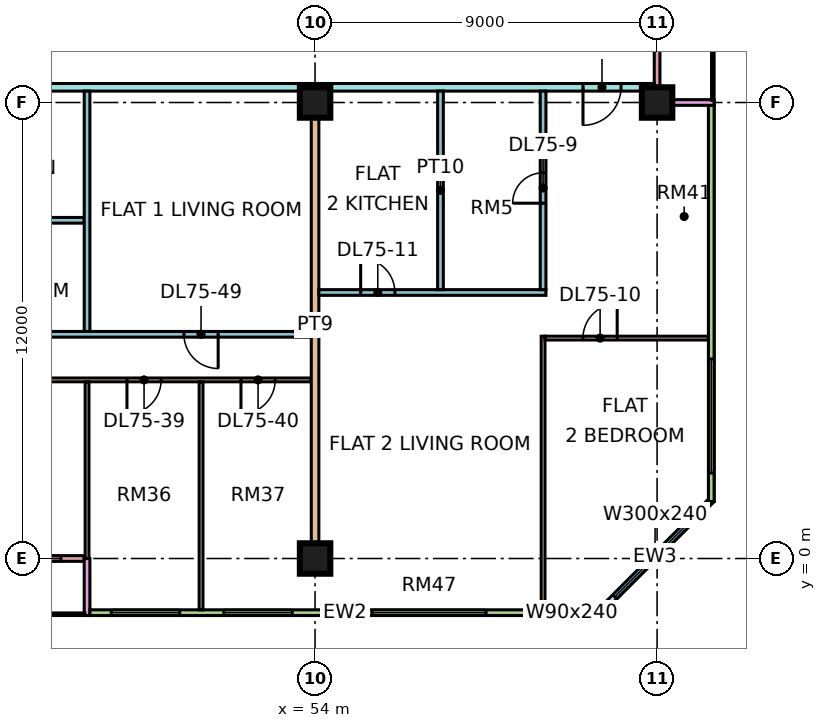
"""IFC4 building model, lengths in metres.
Left out: names, types, materials, properties, quantities, classifications, styles, units other than length and angle.
Written with IfcOpenShell. Run it as: python <this file> out.ifc"""

import sys

from ifc_helpers import new_model, si_unit, direction, frame, frame_2d, origin, origin_2d, place, context, subcontext, project, spatial, rectangle, extrude, element, fill, save


model = new_model("IFC4")
c1 = context("Model", 3, precision=1e-05, world=origin(), true_north=direction((0.0, 1.0)))
c2 = subcontext(c1, "Body", "Model", "MODEL_VIEW")
j1 = project(units=[si_unit("LENGTHUNIT", "METRE"), si_unit("PLANEANGLEUNIT", "RADIAN")], contexts=[c1])
p1 = place(None, origin())
s1 = spatial("IfcSite", under=j1, at=p1, CompositionType="ELEMENT")
p2 = place(p1, origin())
s2 = spatial("IfcBuilding", under=s1, at=p2, CompositionType="ELEMENT")
p3 = place(p2, frame((0.0, 0.0, 318.4)))
s3 = spatial("IfcBuildingStorey", under=s2, at=p3, CompositionType="ELEMENT", Elevation=318.4)
for number, where, z_axis, x_axis in (
    (1, (54.0, 0.0, 0.0), (0.0, 0.0, 1.0), (1.0, 0.0, 0.0)),
    (2, (54.0, 12.0, 0.0), (0.0, 0.0, 1.0), (1.0, 0.0, 0.0)),
    (3, (63.0, 12.0, 0.0), (0.0, 0.0, 1.0), (1.0, 0.0, 0.0)),
):
    element("IfcColumn", number, at=place(p3, frame(where, z_axis=z_axis, x_axis=x_axis)), inside=s3, PredefinedType="COLUMN", context=c2, shape_type="SweptSolid", body=[
        extrude(rectangle(XDim=0.8, YDim=0.8, at=origin_2d()), origin(), (0.0, 0.0, 1.0), 3.75),
    ])
p4 = place(p3, frame((36.075, 0.0, 0.0), z_axis=(0.0, 0.0, 1.0), x_axis=(1.0, 0.0, 0.0)))
e4 = element("IfcWall", 4, at=p4, inside=s3, PredefinedType="SOLIDWALL", context=c2, shape_type="SweptSolid", body=[
    extrude(rectangle(XDim=11.85, YDim=0.15, at=frame_2d((5.925, 0.0))), origin(), (0.0, 0.0, 1.0), 3.3),
])
p5 = place(p4, frame((0.775, 0.0, 0.45)))
e5 = element("IfcOpeningElement", 5, at=p5, cuts=e4, PredefinedType="OPENING", context=c2, shape_type="SweptSolid", body=[
    extrude(rectangle(XDim=1.8, YDim=2.4, at=frame_2d((0.9, 1.2))), frame((0.0, 0.085, 0.0), z_axis=(0.0, -1.0, 0.0), x_axis=(1.0, 0.0, 0.0)), (0.0, 0.0, 1.0), 0.17),
])
p6 = place(p4, frame((4.775, 0.0, 0.0)))
e6 = element("IfcOpeningElement", 6, at=p6, cuts=e4, PredefinedType="OPENING", context=c2, shape_type="SweptSolid", body=[
    extrude(rectangle(XDim=1.8, YDim=2.4, at=frame_2d((0.9, 1.2))), frame((0.0, 0.085, 0.0), z_axis=(0.0, -1.0, 0.0), x_axis=(1.0, 0.0, 0.0)), (0.0, 0.0, 1.0), 0.17),
])
p7 = place(p4, frame((10.038, 0.0, 0.45)))
e7 = element("IfcOpeningElement", 7, at=p7, cuts=e4, PredefinedType="OPENING", context=c2, shape_type="SweptSolid", body=[
    extrude(rectangle(XDim=1.2, YDim=2.4, at=frame_2d((0.6, 1.2))), frame((0.0, 0.085, 0.0), z_axis=(0.0, -1.0, 0.0), x_axis=(1.0, 0.0, 0.0)), (0.0, 0.0, 1.0), 0.17),
])
p8 = place(p3, frame((48.0, -1.5, 0.0), z_axis=(0.0, 0.0, 1.0), x_axis=(0.0, 1.0, 0.0)))
e8 = element("IfcWall", 8, at=p8, inside=s3, PredefinedType="SOLIDWALL", context=c2, shape_type="SweptSolid", body=[
    extrude(rectangle(XDim=1.5, YDim=0.15, at=frame_2d((0.75, 0.0))), origin(), (0.0, 0.0, 1.0), 3.3),
])
p9 = place(p3, frame((48.075, -1.425, 0.0), z_axis=(0.0, 0.0, 1.0), x_axis=(1.0, 0.0, 0.0)))
e9 = element("IfcWall", 9, at=p9, inside=s3, PredefinedType="SOLIDWALL", context=c2, shape_type="SweptSolid", body=[
    extrude(rectangle(XDim=13.425, YDim=0.15, at=frame_2d((6.712, 0.0))), origin(), (0.0, 0.0, 1.0), 3.3),
])
p10 = place(p9, frame((0.562, 0.0, 0.45)))
e10 = element("IfcOpeningElement", 10, at=p10, cuts=e9, PredefinedType="OPENING", context=c2, shape_type="SweptSolid", body=[
    extrude(rectangle(XDim=1.8, YDim=2.4, at=frame_2d((0.9, 1.2))), frame((0.0, 0.085, 0.0), z_axis=(0.0, -1.0, 0.0), x_axis=(1.0, 0.0, 0.0)), (0.0, 0.0, 1.0), 0.17),
])
p11 = place(p9, frame((3.525, 0.0, 0.45)))
e11 = element("IfcOpeningElement", 11, at=p11, cuts=e9, PredefinedType="OPENING", context=c2, shape_type="SweptSolid", body=[
    extrude(rectangle(XDim=1.8, YDim=2.4, at=frame_2d((0.9, 1.2))), frame((0.0, 0.085, 0.0), z_axis=(0.0, -1.0, 0.0), x_axis=(1.0, 0.0, 0.0)), (0.0, 0.0, 1.0), 0.17),
])
p12 = place(p9, frame((7.425, 0.0, 0.45)))
e12 = element("IfcOpeningElement", 12, at=p12, cuts=e9, PredefinedType="OPENING", context=c2, shape_type="SweptSolid", body=[
    extrude(rectangle(XDim=3.0, YDim=2.4, at=frame_2d((1.5, 1.2))), frame((0.0, 0.085, 0.0), z_axis=(0.0, -1.0, 0.0), x_axis=(1.0, 0.0, 0.0)), (0.0, 0.0, 1.0), 0.17),
])
p13 = place(p9, frame((12.225, 0.0, 0.45)))
e13 = element("IfcOpeningElement", 13, at=p13, cuts=e9, PredefinedType="OPENING", context=c2, shape_type="SweptSolid", body=[
    extrude(rectangle(XDim=0.9, YDim=2.4, at=frame_2d((0.45, 1.2))), frame((0.0, 0.085, 0.0), z_axis=(0.0, -1.0, 0.0), x_axis=(1.0, 0.0, 0.0)), (0.0, 0.0, 1.0), 0.17),
])
p14 = place(p3, frame((61.447, -1.447, 0.0), z_axis=(0.0, 0.0, 1.0), x_axis=(0.707106781187, 0.707106781187, 0.0)))
e14 = element("IfcWall", 14, at=p14, inside=s3, PredefinedType="SOLIDWALL", context=c2, shape_type="SweptSolid", body=[
    extrude(rectangle(XDim=4.243, YDim=0.15, at=frame_2d((2.121, 0.0))), origin(), (0.0, 0.0, 1.0), 3.3),
])
p15 = place(p14, frame((0.621, 0.0, 0.45)))
e15 = element("IfcOpeningElement", 15, at=p15, cuts=e14, PredefinedType="OPENING", context=c2, shape_type="SweptSolid", body=[
    extrude(rectangle(XDim=3.0, YDim=2.4, at=frame_2d((1.5, 1.2))), frame((0.0, 0.085, 0.0), z_axis=(0.0, -1.0, 0.0), x_axis=(1.0, 0.0, 0.0)), (0.0, 0.0, 1.0), 0.17),
])
p16 = place(p3, frame((64.425, 1.5, 0.0), z_axis=(0.0, 0.0, 1.0), x_axis=(0.0, 1.0, 0.0)))
e16 = element("IfcWall", 16, at=p16, inside=s3, PredefinedType="SOLIDWALL", context=c2, shape_type="SweptSolid", body=[
    extrude(rectangle(XDim=10.425, YDim=0.15, at=frame_2d((5.212, 0.0))), origin(), (0.0, 0.0, 1.0), 3.3),
])
p17 = place(p16, frame((0.75, 0.0, 0.45)))
e17 = element("IfcOpeningElement", 17, at=p17, cuts=e16, PredefinedType="OPENING", context=c2, shape_type="SweptSolid", body=[
    extrude(rectangle(XDim=3.0, YDim=2.4, at=frame_2d((1.5, 1.2))), frame((0.0, 0.085, 0.0), z_axis=(0.0, -1.0, 0.0), x_axis=(1.0, 0.0, 0.0)), (0.0, 0.0, 1.0), 0.17),
])
p18 = place(p3, frame((63.0, 12.075, 0.0), z_axis=(0.0, 0.0, 1.0), x_axis=(0.0, 1.0, 0.0)))
e18 = element("IfcWall", 18, at=p18, inside=s3, PredefinedType="SOLIDWALL", context=c2, shape_type="SweptSolid", body=[
    extrude(rectangle(XDim=10.35, YDim=0.15, at=frame_2d((5.175, 0.0))), origin(), (0.0, 0.0, 1.0), 3.3),
])
p19 = place(p18, frame((6.038, 0.0, 0.0)))
e19 = element("IfcOpeningElement", 19, at=p19, cuts=e18, PredefinedType="OPENING", context=c2, shape_type="SweptSolid", body=[
    extrude(rectangle(XDim=1.8, YDim=2.4, at=frame_2d((0.9, 1.2))), frame((0.0, 0.085, 0.0), z_axis=(0.0, -1.0, 0.0), x_axis=(1.0, 0.0, 0.0)), (0.0, 0.0, 1.0), 0.17),
])
p20 = place(p3, frame((64.5, 12.0, 0.0), z_axis=(0.0, 0.0, 1.0), x_axis=(-1.0, 0.0, 0.0)))
e20 = element("IfcWall", 20, at=p20, inside=s3, PredefinedType="SOLIDWALL", context=c2, shape_type="SweptSolid", body=[
    extrude(rectangle(XDim=1.5, YDim=0.15, at=frame_2d((0.75, 0.0))), origin(), (0.0, 0.0, 1.0), 3.3),
])
p21 = place(p3, frame((33.05, 4.7, 0.0), z_axis=(0.0, 0.0, 1.0), x_axis=(1.0, 0.0, 0.0)))
e21 = element("IfcWall", 21, at=p21, inside=s3, PredefinedType="PARTITIONING", context=c2, shape_type="SweptSolid", body=[
    extrude(rectangle(XDim=20.85, YDim=0.1, at=frame_2d((10.425, 0.0))), origin(), (0.0, 0.0, 1.0), 3.3),
])
p22 = place(p21, frame((1.0, 0.0, 0.0)))
e22 = element("IfcOpeningElement", 22, at=p22, cuts=e21, PredefinedType="OPENING", context=c2, shape_type="SweptSolid", body=[
    extrude(rectangle(XDim=0.9, YDim=2.1, at=frame_2d((0.45, 1.05))), frame((0.0, 0.06, 0.0), z_axis=(0.0, -1.0, 0.0), x_axis=(1.0, 0.0, 0.0)), (0.0, 0.0, 1.0), 0.12),
])
p23 = place(p21, frame((4.0, 0.0, 0.0)))
e23 = element("IfcOpeningElement", 23, at=p23, cuts=e21, PredefinedType="OPENING", context=c2, shape_type="SweptSolid", body=[
    extrude(rectangle(XDim=0.9, YDim=2.1, at=frame_2d((0.45, 1.05))), frame((0.0, 0.06, 0.0), z_axis=(0.0, -1.0, 0.0), x_axis=(1.0, 0.0, 0.0)), (0.0, 0.0, 1.0), 0.12),
])
p24 = place(p21, frame((16.0, 0.0, 0.0)))
e24 = element("IfcOpeningElement", 24, at=p24, cuts=e21, PredefinedType="OPENING", context=c2, shape_type="SweptSolid", body=[
    extrude(rectangle(XDim=0.9, YDim=2.1, at=frame_2d((0.45, 1.05))), frame((0.0, 0.06, 0.0), z_axis=(0.0, -1.0, 0.0), x_axis=(1.0, 0.0, 0.0)), (0.0, 0.0, 1.0), 0.12),
])
p25 = place(p21, frame((19.0, 0.0, 0.0)))
e25 = element("IfcOpeningElement", 25, at=p25, cuts=e21, PredefinedType="OPENING", context=c2, shape_type="SweptSolid", body=[
    extrude(rectangle(XDim=0.9, YDim=2.1, at=frame_2d((0.45, 1.05))), frame((0.0, 0.06, 0.0), z_axis=(0.0, -1.0, 0.0), x_axis=(1.0, 0.0, 0.0)), (0.0, 0.0, 1.0), 0.12),
])
p26 = place(p21, frame((10.0, 0.0, 0.0)))
e26 = element("IfcOpeningElement", 26, at=p26, cuts=e21, PredefinedType="OPENING", context=c2, shape_type="SweptSolid", body=[
    extrude(rectangle(XDim=0.9, YDim=2.1, at=frame_2d((0.45, 1.05))), frame((0.0, 0.06, 0.0), z_axis=(0.0, -1.0, 0.0), x_axis=(1.0, 0.0, 0.0)), (0.0, 0.0, 1.0), 0.12),
])
p27 = place(p3, frame((40.65, 12.4, 0.0), z_axis=(0.0, 0.0, 1.0), x_axis=(1.0, 0.0, 0.0)))
e27 = element("IfcWall", 27, at=p27, inside=s3, PredefinedType="PARTITIONING", context=c2, shape_type="SweptSolid", body=[
    extrude(rectangle(XDim=22.276, YDim=0.2, at=frame_2d((11.138, 0.0))), origin(), (0.0, 0.0, 1.0), 3.3),
])
p28 = place(p27, frame((20.4, 0.0, 0.0)))
e28 = element("IfcOpeningElement", 28, at=p28, cuts=e27, PredefinedType="OPENING", context=c2, shape_type="SweptSolid", body=[
    extrude(rectangle(XDim=1.0, YDim=2.1, at=frame_2d((0.5, 1.05))), frame((0.0, 0.11, 0.0), z_axis=(0.0, -1.0, 0.0), x_axis=(1.0, 0.0, 0.0)), (0.0, 0.0, 1.0), 0.22),
])
p29 = place(p27, frame((1.05, 0.0, 0.0)))
e29 = element("IfcOpeningElement", 29, at=p29, cuts=e27, PredefinedType="OPENING", context=c2, shape_type="SweptSolid", body=[
    extrude(rectangle(XDim=1.0, YDim=2.1, at=frame_2d((0.5, 1.05))), frame((0.0, 0.11, 0.0), z_axis=(0.0, -1.0, 0.0), x_axis=(1.0, 0.0, 0.0)), (0.0, 0.0, 1.0), 0.22),
])
p30 = place(p3, frame((43.575, 5.9, 0.0), z_axis=(0.0, 0.0, 1.0), x_axis=(1.0, 0.0, 0.0)))
e30 = element("IfcWall", 30, at=p30, inside=s3, PredefinedType="PARTITIONING", context=c2, shape_type="SweptSolid", body=[
    extrude(rectangle(XDim=10.325, YDim=0.15, at=frame_2d((5.163, 0.0))), origin(), (0.0, 0.0, 1.0), 3.3),
])
p31 = place(p30, frame((1.825, 0.0, 0.0)))
e31 = element("IfcOpeningElement", 31, at=p31, cuts=e30, PredefinedType="OPENING", context=c2, shape_type="SweptSolid", body=[
    extrude(rectangle(XDim=0.8, YDim=2.1, at=frame_2d((0.4, 1.05))), frame((0.0, 0.085, 0.0), z_axis=(0.0, -1.0, 0.0), x_axis=(1.0, 0.0, 0.0)), (0.0, 0.0, 1.0), 0.17),
])
p32 = place(p30, frame((6.975, 0.0, 0.0)))
e32 = element("IfcOpeningElement", 32, at=p32, cuts=e30, PredefinedType="OPENING", context=c2, shape_type="SweptSolid", body=[
    extrude(rectangle(XDim=0.9, YDim=2.1, at=frame_2d((0.45, 1.05))), frame((0.0, 0.085, 0.0), z_axis=(0.0, -1.0, 0.0), x_axis=(1.0, 0.0, 0.0)), (0.0, 0.0, 1.0), 0.17),
])
p33 = place(p3, frame((43.725, 8.9, 0.0), z_axis=(0.0, 0.0, 1.0), x_axis=(1.0, 0.0, 0.0)))
e33 = element("IfcWall", 33, at=p33, inside=s3, PredefinedType="PARTITIONING", context=c2, shape_type="SweptSolid", body=[
    extrude(rectangle(XDim=4.2, YDim=0.15, at=frame_2d((2.1, 0.0))), origin(), (0.0, 0.0, 1.0), 3.3),
])
p34 = place(p3, frame((48.0, 0.0, 0.0), z_axis=(0.0, 0.0, 1.0), x_axis=(0.0, 1.0, 0.0)))
e34 = element("IfcWall", 34, at=p34, inside=s3, PredefinedType="PARTITIONING", context=c2, shape_type="SweptSolid", body=[
    extrude(rectangle(XDim=4.65, YDim=0.1, at=frame_2d((2.325, 0.0))), origin(), (0.0, 0.0, 1.0), 3.3),
])
p35 = place(p3, frame((48.0, 5.975, 0.0), z_axis=(0.0, 0.0, 1.0), x_axis=(0.0, 1.0, 0.0)))
e35 = element("IfcWall", 35, at=p35, inside=s3, PredefinedType="PARTITIONING", context=c2, shape_type="SweptSolid", body=[
    extrude(rectangle(XDim=6.325, YDim=0.15, at=frame_2d((3.163, 0.0))), origin(), (0.0, 0.0, 1.0), 3.3),
])
p36 = place(p3, frame((51.0, -1.351, 0.0), z_axis=(0.0, 0.0, 1.0), x_axis=(0.0, 1.0, 0.0)))
e36 = element("IfcWall", 36, at=p36, inside=s3, PredefinedType="PARTITIONING", context=c2, shape_type="SweptSolid", body=[
    extrude(rectangle(XDim=6.001, YDim=0.1, at=frame_2d((3.0, 0.0))), origin(), (0.0, 0.0, 1.0), 3.3),
])
p37 = place(p3, frame((54.0, 0.0, 0.0), z_axis=(0.0, 0.0, 1.0), x_axis=(0.0, 1.0, 0.0)))
e37 = element("IfcWall", 37, at=p37, inside=s3, PredefinedType="PARTITIONING", context=c2, shape_type="SweptSolid", body=[
    extrude(rectangle(XDim=12.3, YDim=0.2, at=frame_2d((6.15, 0.0))), origin(), (0.0, 0.0, 1.0), 3.3),
])
p38 = place(p3, frame((54.1, 7.0, 0.0), z_axis=(0.0, 0.0, 1.0), x_axis=(1.0, 0.0, 0.0)))
e38 = element("IfcWall", 38, at=p38, inside=s3, PredefinedType="PARTITIONING", context=c2, shape_type="SweptSolid", body=[
    extrude(rectangle(XDim=5.975, YDim=0.15, at=frame_2d((2.987, 0.0))), origin(), (0.0, 0.0, 1.0), 3.3),
])
p39 = place(p38, frame((1.1, 0.0, 0.0)))
e39 = element("IfcOpeningElement", 39, at=p39, cuts=e38, PredefinedType="OPENING", context=c2, shape_type="SweptSolid", body=[
    extrude(rectangle(XDim=0.9, YDim=2.1, at=frame_2d((0.45, 1.05))), frame((0.0, 0.085, 0.0), z_axis=(0.0, -1.0, 0.0), x_axis=(1.0, 0.0, 0.0)), (0.0, 0.0, 1.0), 0.17),
])
p40 = place(p3, frame((57.3, 7.075, 0.0), z_axis=(0.0, 0.0, 1.0), x_axis=(0.0, 1.0, 0.0)))
e40 = element("IfcWall", 40, at=p40, inside=s3, PredefinedType="PARTITIONING", context=c2, shape_type="SweptSolid", body=[
    extrude(rectangle(XDim=5.225, YDim=0.15, at=frame_2d((2.613, 0.0))), origin(), (0.0, 0.0, 1.0), 3.3),
])
p41 = place(p3, frame((60.0, -1.35, 0.0), z_axis=(0.0, 0.0, 1.0), x_axis=(0.0, 1.0, 0.0)))
e41 = element("IfcWall", 41, at=p41, inside=s3, PredefinedType="PARTITIONING", context=c2, shape_type="SweptSolid", body=[
    extrude(rectangle(XDim=7.2, YDim=0.1, at=frame_2d((3.6, 0.0))), origin(), (0.0, 0.0, 1.0), 3.3),
])
p42 = place(p3, frame((60.0, 7.075, 0.0), z_axis=(0.0, 0.0, 1.0), x_axis=(0.0, 1.0, 0.0)))
e42 = element("IfcWall", 42, at=p42, inside=s3, PredefinedType="PARTITIONING", context=c2, shape_type="SweptSolid", body=[
    extrude(rectangle(XDim=5.225, YDim=0.15, at=frame_2d((2.613, 0.0))), origin(), (0.0, 0.0, 1.0), 3.3),
])
p43 = place(p42, frame((2.275, 0.0, 0.0)))
e43 = element("IfcOpeningElement", 43, at=p43, cuts=e42, PredefinedType="OPENING", context=c2, shape_type="SweptSolid", body=[
    extrude(rectangle(XDim=0.8, YDim=2.1, at=frame_2d((0.4, 1.05))), frame((0.0, 0.085, 0.0), z_axis=(0.0, -1.0, 0.0), x_axis=(1.0, 0.0, 0.0)), (0.0, 0.0, 1.0), 0.17),
])
p44 = place(p3, frame((60.05, 5.8, 0.0), z_axis=(0.0, 0.0, 1.0), x_axis=(1.0, 0.0, 0.0)))
e44 = element("IfcWall", 44, at=p44, inside=s3, PredefinedType="PARTITIONING", context=c2, shape_type="SweptSolid", body=[
    extrude(rectangle(XDim=4.3, YDim=0.1, at=frame_2d((2.15, 0.0))), origin(), (0.0, 0.0, 1.0), 3.3),
])
p45 = place(p44, frame((1.0, 0.0, 0.0)))
e45 = element("IfcOpeningElement", 45, at=p45, cuts=e44, PredefinedType="OPENING", context=c2, shape_type="SweptSolid", body=[
    extrude(rectangle(XDim=0.9, YDim=2.1, at=frame_2d((0.45, 1.05))), frame((0.0, 0.06, 0.0), z_axis=(0.0, -1.0, 0.0), x_axis=(1.0, 0.0, 0.0)), (0.0, 0.0, 1.0), 0.12),
])
p46 = place(p7, origin())
e46 = element("IfcWindow", 46, at=p46, inside=s3, PartitioningType="SINGLE_PANEL", PredefinedType="WINDOW", context=c2, shape_type="SweptSolid", body=[
    extrude(rectangle(XDim=1.2, YDim=2.4, at=frame_2d((0.6, 1.2))), frame((0.0, 0.03, 0.0), z_axis=(0.0, -1.0, 0.0), x_axis=(1.0, 0.0, 0.0)), (0.0, 0.0, 1.0), 0.06),
])
fill(e7, e46)
p47 = place(p10, origin())
e47 = element("IfcWindow", 47, at=p47, inside=s3, PartitioningType="SINGLE_PANEL", PredefinedType="WINDOW", context=c2, shape_type="SweptSolid", body=[
    extrude(rectangle(XDim=1.8, YDim=2.4, at=frame_2d((0.9, 1.2))), frame((0.0, 0.03, 0.0), z_axis=(0.0, -1.0, 0.0), x_axis=(1.0, 0.0, 0.0)), (0.0, 0.0, 1.0), 0.06),
])
fill(e10, e47)
p48 = place(p11, origin())
e48 = element("IfcWindow", 48, at=p48, inside=s3, PartitioningType="SINGLE_PANEL", PredefinedType="WINDOW", context=c2, shape_type="SweptSolid", body=[
    extrude(rectangle(XDim=1.8, YDim=2.4, at=frame_2d((0.9, 1.2))), frame((0.0, 0.03, 0.0), z_axis=(0.0, -1.0, 0.0), x_axis=(1.0, 0.0, 0.0)), (0.0, 0.0, 1.0), 0.06),
])
fill(e11, e48)
p49 = place(p12, origin())
e49 = element("IfcWindow", 49, at=p49, inside=s3, PartitioningType="SINGLE_PANEL", PredefinedType="WINDOW", context=c2, shape_type="SweptSolid", body=[
    extrude(rectangle(XDim=3.0, YDim=2.4, at=frame_2d((1.5, 1.2))), frame((0.0, 0.03, 0.0), z_axis=(0.0, -1.0, 0.0), x_axis=(1.0, 0.0, 0.0)), (0.0, 0.0, 1.0), 0.06),
])
fill(e12, e49)
p50 = place(p13, origin())
e50 = element("IfcWindow", 50, at=p50, inside=s3, PartitioningType="SINGLE_PANEL", PredefinedType="WINDOW", context=c2, shape_type="SweptSolid", body=[
    extrude(rectangle(XDim=0.9, YDim=2.4, at=frame_2d((0.45, 1.2))), frame((0.0, 0.03, 0.0), z_axis=(0.0, -1.0, 0.0), x_axis=(1.0, 0.0, 0.0)), (0.0, 0.0, 1.0), 0.06),
])
fill(e13, e50)
p51 = place(p15, origin())
e51 = element("IfcWindow", 51, at=p51, inside=s3, PartitioningType="SINGLE_PANEL", PredefinedType="WINDOW", context=c2, shape_type="SweptSolid", body=[
    extrude(rectangle(XDim=3.0, YDim=2.4, at=frame_2d((1.5, 1.2))), frame((0.0, 0.03, 0.0), z_axis=(0.0, -1.0, 0.0), x_axis=(1.0, 0.0, 0.0)), (0.0, 0.0, 1.0), 0.06),
])
fill(e15, e51)
p52 = place(p17, origin())
e52 = element("IfcWindow", 52, at=p52, inside=s3, PartitioningType="SINGLE_PANEL", PredefinedType="WINDOW", context=c2, shape_type="SweptSolid", body=[
    extrude(rectangle(XDim=3.0, YDim=2.4, at=frame_2d((1.5, 1.2))), frame((0.0, 0.03, 0.0), z_axis=(0.0, -1.0, 0.0), x_axis=(1.0, 0.0, 0.0)), (0.0, 0.0, 1.0), 0.06),
])
fill(e17, e52)
p53 = place(p43, origin())
e53 = element("IfcDoor", 53, at=p53, inside=s3, OperationType="SINGLE_SWING_LEFT", PredefinedType="DOOR", context=c2, shape_type="SweptSolid", body=[
    extrude(rectangle(XDim=0.8, YDim=2.1, at=frame_2d((0.4, 1.05))), frame((0.0, 0.025, 0.0), z_axis=(0.0, -1.0, 0.0), x_axis=(1.0, 0.0, 0.0)), (0.0, 0.0, 1.0), 0.05),
])
fill(e43, e53)
p54 = place(p45, frame((0.9, 0.0, 0.0), z_axis=(0.0, 0.0, 1.0), x_axis=(-1.0, 0.0, 0.0)))
e54 = element("IfcDoor", 54, at=p54, inside=s3, OperationType="SINGLE_SWING_RIGHT", PredefinedType="DOOR", context=c2, shape_type="SweptSolid", body=[
    extrude(rectangle(XDim=0.9, YDim=2.1, at=frame_2d((0.45, 1.05))), frame((0.0, 0.025, 0.0), z_axis=(0.0, -1.0, 0.0), x_axis=(1.0, 0.0, 0.0)), (0.0, 0.0, 1.0), 0.05),
])
fill(e45, e54)
p55 = place(p39, origin())
e55 = element("IfcDoor", 55, at=p55, inside=s3, OperationType="SINGLE_SWING_LEFT", PredefinedType="DOOR", context=c2, shape_type="SweptSolid", body=[
    extrude(rectangle(XDim=0.9, YDim=2.1, at=frame_2d((0.45, 1.05))), frame((0.0, 0.025, 0.0), z_axis=(0.0, -1.0, 0.0), x_axis=(1.0, 0.0, 0.0)), (0.0, 0.0, 1.0), 0.05),
])
fill(e39, e55)
p56 = place(p28, frame((1.0, 0.0, 0.0), z_axis=(0.0, 0.0, 1.0), x_axis=(-1.0, 0.0, 0.0)))
e56 = element("IfcDoor", 56, at=p56, inside=s3, OperationType="SINGLE_SWING_LEFT", PredefinedType="DOOR", context=c2, shape_type="SweptSolid", body=[
    extrude(rectangle(XDim=1.0, YDim=2.1, at=frame_2d((0.5, 1.05))), frame((0.0, 0.025, 0.0), z_axis=(0.0, -1.0, 0.0), x_axis=(1.0, 0.0, 0.0)), (0.0, 0.0, 1.0), 0.05),
])
fill(e28, e56)
p57 = place(p24, frame((0.9, 0.0, 0.0), z_axis=(0.0, 0.0, 1.0), x_axis=(-1.0, 0.0, 0.0)))
e57 = element("IfcDoor", 57, at=p57, inside=s3, OperationType="SINGLE_SWING_LEFT", PredefinedType="DOOR", context=c2, shape_type="SweptSolid", body=[
    extrude(rectangle(XDim=0.9, YDim=2.1, at=frame_2d((0.45, 1.05))), frame((0.0, 0.025, 0.0), z_axis=(0.0, -1.0, 0.0), x_axis=(1.0, 0.0, 0.0)), (0.0, 0.0, 1.0), 0.05),
])
fill(e24, e57)
p58 = place(p25, frame((0.9, 0.0, 0.0), z_axis=(0.0, 0.0, 1.0), x_axis=(-1.0, 0.0, 0.0)))
e58 = element("IfcDoor", 58, at=p58, inside=s3, OperationType="SINGLE_SWING_LEFT", PredefinedType="DOOR", context=c2, shape_type="SweptSolid", body=[
    extrude(rectangle(XDim=0.9, YDim=2.1, at=frame_2d((0.45, 1.05))), frame((0.0, 0.025, 0.0), z_axis=(0.0, -1.0, 0.0), x_axis=(1.0, 0.0, 0.0)), (0.0, 0.0, 1.0), 0.05),
])
fill(e25, e58)
p59 = place(p32, origin())
e59 = element("IfcDoor", 59, at=p59, inside=s3, OperationType="SINGLE_SWING_RIGHT", PredefinedType="DOOR", context=c2, shape_type="SweptSolid", body=[
    extrude(rectangle(XDim=0.9, YDim=2.1, at=frame_2d((0.45, 1.05))), frame((0.0, 0.025, 0.0), z_axis=(0.0, -1.0, 0.0), x_axis=(1.0, 0.0, 0.0)), (0.0, 0.0, 1.0), 0.05),
])
fill(e32, e59)
save(model, sys.argv[1])
